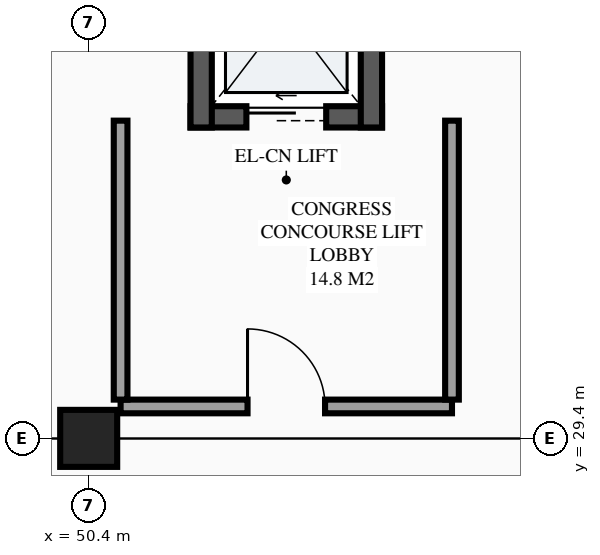
"""IFC4 building model, lengths in metres.
Left out: names, types, materials, properties, quantities, classifications, styles, units other than length and angle.
Written with IfcOpenShell. Run it as: python <this file> out.ifc"""

import sys

from ifc_helpers import new_model, si_unit, direction, frame, frame_2d, origin, origin_2d, place, context, subcontext, project, spatial, rectangle, extrude, element, fill, save


model = new_model("IFC4")
c1 = context("Model", 3, precision=1e-05, world=origin(), true_north=direction((0.0, 1.0)))
c2 = subcontext(c1, "Body", "Model", "MODEL_VIEW")
j1 = project(units=[si_unit("LENGTHUNIT", "METRE"), si_unit("PLANEANGLEUNIT", "RADIAN")], contexts=[c1])
p1 = place(None, origin())
s1 = spatial("IfcSite", under=j1, at=p1, CompositionType="ELEMENT")
p2 = place(p1, origin())
s2 = spatial("IfcBuilding", under=s1, at=p2, CompositionType="ELEMENT")
p3 = place(p2, frame((0.0, 0.0, 5.4)))
s3 = spatial("IfcBuildingStorey", under=s2, at=p3, CompositionType="ELEMENT", Elevation=5.4)
p4 = place(p3, frame((50.4, 29.4, 0.0), z_axis=(0.0, 0.0, 1.0), x_axis=(1.0, 0.0, 0.0)))
e1 = element("IfcColumn", 1, at=p4, inside=s3, PredefinedType="COLUMN", context=c2, shape_type="SweptSolid", body=[
    extrude(rectangle(XDim=0.75, YDim=0.75, at=origin_2d()), origin(), (0.0, 0.0, 1.0), 4.5),
])
p5 = place(p3, frame((51.74, 33.63, 0.0), z_axis=(0.0, 0.0, 1.0), x_axis=(1.0, 0.0, 0.0)))
e2 = element("IfcWall", 2, at=p5, inside=s3, PredefinedType="SHEAR", context=c2, shape_type="SweptSolid", body=[
    extrude(rectangle(XDim=2.52, YDim=0.28, at=frame_2d((1.26, 0.0))), origin(), (0.0, 0.0, 1.0), 4.5),
])
p6 = place(p5, frame((0.735, 0.0, 0.0)))
e3 = element("IfcOpeningElement", 3, at=p6, cuts=e2, PredefinedType="OPENING", context=c2, shape_type="SweptSolid", body=[
    extrude(rectangle(XDim=1.05, YDim=2.2, at=frame_2d((0.525, 1.1))), frame((0.0, 0.15, 0.0), z_axis=(0.0, -1.0, 0.0), x_axis=(1.0, 0.0, 0.0)), (0.0, 0.0, 1.0), 0.3),
])
for number, where, z_axis, x_axis in (
    (4, (54.12, 33.49, 0.0), (0.0, 0.0, 1.0), (0.0, 1.0, 0.0)),
    (5, (51.88, 36.51, 0.0), (0.0, 0.0, 1.0), (0.0, -1.0, 0.0)),
):
    element("IfcWall", number, at=place(p3, frame(where, z_axis=z_axis, x_axis=x_axis)), inside=s3, PredefinedType="SHEAR", context=c2, shape_type="SweptSolid", body=[
        extrude(rectangle(XDim=3.02, YDim=0.28, at=frame_2d((1.51, 0.0))), origin(), (0.0, 0.0, 1.0), 4.5),
    ])
p7 = place(p3, frame((50.82, 29.82, 0.0), z_axis=(0.0, 0.0, 1.0), x_axis=(1.0, 0.0, 0.0)))
e6 = element("IfcWall", 6, at=p7, inside=s3, PredefinedType="PARTITIONING", context=c2, shape_type="SweptSolid", body=[
    extrude(rectangle(XDim=4.36, YDim=0.18, at=frame_2d((2.18, 0.0))), origin(), (0.0, 0.0, 1.0), 4.235),
])
p8 = place(p7, frame((1.67, 0.0, 0.0)))
e7 = element("IfcOpeningElement", 7, at=p8, cuts=e6, PredefinedType="OPENING", context=c2, shape_type="SweptSolid", body=[
    extrude(rectangle(XDim=1.02, YDim=2.15, at=frame_2d((0.51, 1.075))), frame((0.0, 0.1, 0.0), z_axis=(0.0, -1.0, 0.0), x_axis=(1.0, 0.0, 0.0)), (0.0, 0.0, 1.0), 0.2),
])
for number, where, z_axis, x_axis in (
    (8, (50.82, 29.91, 0.0), (0.0, 0.0, 1.0), (0.0, 1.0, 0.0)),
    (9, (55.18, 29.91, 0.0), (0.0, 0.0, 1.0), (0.0, 1.0, 0.0)),
):
    element("IfcWall", number, at=place(p3, frame(where, z_axis=z_axis, x_axis=x_axis)), inside=s3, PredefinedType="PARTITIONING", context=c2, shape_type="SweptSolid", body=[
        extrude(rectangle(XDim=3.67, YDim=0.18, at=frame_2d((1.835, 0.0))), origin(), (0.0, 0.0, 1.0), 4.235),
    ])
p9 = place(p6, origin())
e10 = element("IfcDoor", 10, at=p9, inside=s3, OperationType="SLIDING_TO_LEFT", PredefinedType="DOOR", context=c2, shape_type="SweptSolid", body=[
    extrude(rectangle(XDim=1.05, YDim=2.2, at=frame_2d((0.525, 1.1))), frame((0.0, 0.025, 0.0), z_axis=(0.0, -1.0, 0.0), x_axis=(1.0, 0.0, 0.0)), (0.0, 0.0, 1.0), 0.05),
])
fill(e3, e10)
p10 = place(p8, origin())
e11 = element("IfcDoor", 11, at=p10, inside=s3, OperationType="SINGLE_SWING_LEFT", PredefinedType="DOOR", context=c2, shape_type="SweptSolid", body=[
    extrude(rectangle(XDim=1.02, YDim=2.15, at=frame_2d((0.51, 1.075))), frame((0.0, 0.025, 0.0), z_axis=(0.0, -1.0, 0.0), x_axis=(1.0, 0.0, 0.0)), (0.0, 0.0, 1.0), 0.05),
])
fill(e7, e11)
save(model, sys.argv[1])
